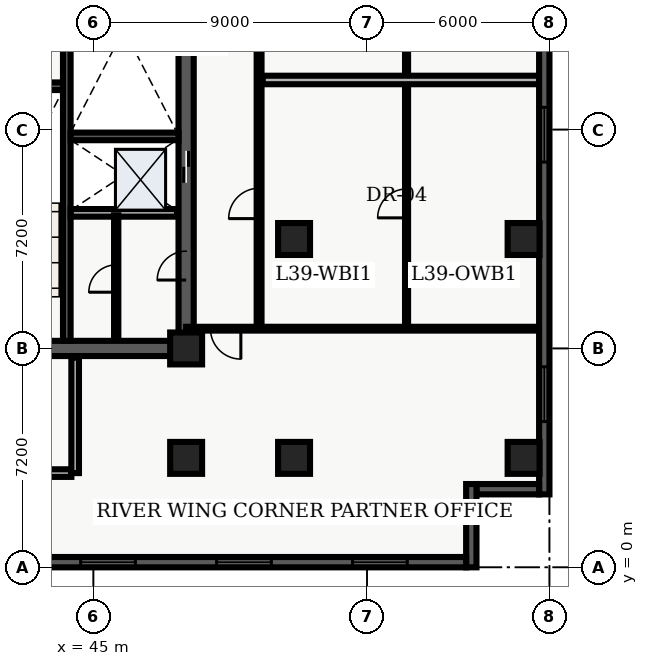
"""IFC4 building model, lengths in metres.
Left out: names, types, materials, properties, quantities, classifications, styles, units other than length and angle.
Written with IfcOpenShell. Run it as: python <this file> out.ifc"""

import sys

from ifc_helpers import new_model, entity, si_unit, converted_unit, direction, frame, origin_with_axes, origin_2d_with_axis, place, context, subcontext, project, spatial, polyline, rectangle, outline, extrude, element, fill, save


model = new_model("IFC4")
c1 = context("Model", 3, precision=1e-05, world=origin_with_axes(), true_north=direction((0.0, 1.0)))
c2 = subcontext(c1, "Body", "Model", "MODEL_VIEW")
j1 = project(units=[si_unit("LENGTHUNIT", "METRE"), converted_unit("PLANEANGLEUNIT", "DEGREE", entity("IfcPlaneAngleMeasure", 0.017), si_unit("PLANEANGLEUNIT", "RADIAN"), dimensions=[0, 0, 0, 0, 0, 0, 0])], contexts=[c1])
p1 = place(None, origin_with_axes())
s1 = spatial("IfcSite", under=j1, at=p1, CompositionType="ELEMENT")
p2 = place(p1, origin_with_axes())
s2 = spatial("IfcBuilding", under=s1, at=p2, CompositionType="ELEMENT")
p3 = place(p2, frame((0.0, 0.0, 160.2), z_axis=(0.0, 0.0, 1.0), x_axis=(1.0, 0.0, 0.0)))
s3 = spatial("IfcBuildingStorey", under=s2, at=p3, CompositionType="ELEMENT", Elevation=160.2)
p4 = place(p3, frame((40.2, 7.2, 0.0), z_axis=(0.0, 0.0, 1.0), x_axis=(1.0, 0.0, 0.0)))
e1 = element("IfcWall", 1, at=p4, inside=s3, PredefinedType="SHEAR", context=c2, shape_type="SweptSolid", body=[
    extrude(outline(polyline([(0.0, -0.25), (7.85, -0.25), (7.85, 0.25), (0.0, 0.25), (0.0, -0.25)])), origin_with_axes(), (0.0, 0.0, 1.0), 3.66),
])
p5 = place(p4, frame((2.175, 0.0, 0.0), z_axis=(0.0, 0.0, 1.0), x_axis=(1.0, 0.0, 0.0)))
e2 = element("IfcOpeningElement", 2, at=p5, cuts=e1, PredefinedType="OPENING", context=c2, shape_type="SweptSolid", body=[
    extrude(rectangle(XDim=1.05, YDim=0.52, at=origin_2d_with_axis()), origin_with_axes(), (0.0, 0.0, 1.0), 2.15),
])
p6 = place(p3, frame((48.05, 7.2, 0.0), z_axis=(0.0, 0.0, 1.0), x_axis=(0.0, 1.0, 0.0)))
e3 = element("IfcWall", 3, at=p6, inside=s3, PredefinedType="SHEAR", context=c2, shape_type="SweptSolid", body=[
    extrude(outline(polyline([(0.0, -0.25), (15.6, -0.25), (15.6, 0.25), (0.0, 0.25), (0.0, -0.25)])), origin_with_axes(), (0.0, 0.0, 1.0), 3.66),
])
p7 = place(p6, frame((5.975, 0.0, 0.0), z_axis=(0.0, 0.0, 1.0), x_axis=(1.0, 0.0, 0.0)))
e4 = element("IfcOpeningElement", 4, at=p7, cuts=e3, PredefinedType="OPENING", context=c2, shape_type="SweptSolid", body=[
    extrude(rectangle(XDim=1.05, YDim=0.52, at=origin_2d_with_axis()), origin_with_axes(), (0.0, 0.0, 1.0), 2.15),
])
p8 = place(p6, frame((2.725, 0.0, 0.0), z_axis=(0.0, 0.0, 1.0), x_axis=(1.0, 0.0, 0.0)))
e5 = element("IfcOpeningElement", 5, at=p8, cuts=e3, PredefinedType="OPENING", context=c2, shape_type="SweptSolid", body=[
    extrude(rectangle(XDim=0.95, YDim=0.52, at=origin_2d_with_axis()), origin_with_axes(), (0.0, 0.0, 1.0), 2.15),
])
p9 = place(p3, frame((44.125, 7.45, 0.0), z_axis=(0.0, 0.0, 1.0), x_axis=(0.0, 1.0, 0.0)))
e6 = element("IfcWall", 6, at=p9, inside=s3, PredefinedType="SHEAR", context=c2, shape_type="SweptSolid", body=[
    extrude(outline(polyline([(0.0, -0.125), (15.1, -0.125), (15.1, 0.125), (0.0, 0.125), (0.0, -0.125)])), origin_with_axes(), (0.0, 0.0, 1.0), 3.66),
])
for number, where, z_axis, x_axis in (
    (7, (40.45, 15.825, 0.0), (0.0, 0.0, 1.0), (1.0, 0.0, 0.0)),
    (8, (44.25, 14.175, 0.0), (0.0, 0.0, 1.0), (1.0, 0.0, 0.0)),
):
    element("IfcWall", number, at=place(p3, frame(where, z_axis=z_axis, x_axis=x_axis)), inside=s3, PredefinedType="SHEAR", context=c2, shape_type="SweptSolid", body=[
        extrude(outline(polyline([(0.0, -0.125), (3.55, -0.125), (3.55, 0.125), (0.0, 0.125), (0.0, -0.125)])), origin_with_axes(), (0.0, 0.0, 1.0), 3.66),
    ])
p10 = place(p3, frame((40.325, 3.1, 0.0), z_axis=(0.0, 0.0, 1.0), x_axis=(1.0, 0.0, 0.0)))
e9 = element("IfcWall", 9, at=p10, inside=s3, PredefinedType="SOLIDWALL", context=c2, shape_type="SweptSolid", body=[
    extrude(outline(polyline([(0.0, -0.125), (3.95, -0.125), (3.95, 0.125), (0.0, 0.125), (0.0, -0.125)])), origin_with_axes(), (0.0, 0.0, 1.0), 2.7),
])
p11 = place(p3, frame((44.4, 3.1, 0.0), z_axis=(0.0, 0.0, 1.0), x_axis=(0.0, 1.0, 0.0)))
e10 = element("IfcWall", 10, at=p11, inside=s3, PredefinedType="SOLIDWALL", context=c2, shape_type="SweptSolid", body=[
    extrude(outline(polyline([(0.0, -0.125), (3.8, -0.125), (3.8, 0.125), (0.0, 0.125), (0.0, -0.125)])), origin_with_axes(), (0.0, 0.0, 1.0), 2.7),
])
for number, where, z_axis, x_axis in (
    (11, (48.05, 3.6, 0.0), (0.0, 0.0, 1.0), (1.0, 0.0, 0.0)),
    (12, (48.05, 7.2, 0.0), (0.0, 0.0, 1.0), (1.0, 0.0, 0.0)),
    (13, (51.6, 3.6, 0.0), (0.0, 0.0, 1.0), (1.0, 0.0, 0.0)),
    (14, (51.6, 10.8, 0.0), (0.0, 0.0, 1.0), (1.0, 0.0, 0.0)),
    (15, (59.15, 3.6, 0.0), (0.0, 0.0, 1.0), (1.0, 0.0, 0.0)),
    (16, (59.15, 10.8, 0.0), (0.0, 0.0, 1.0), (1.0, 0.0, 0.0)),
):
    element("IfcColumn", number, at=place(p3, frame(where, z_axis=z_axis, x_axis=x_axis)), inside=s3, PredefinedType="COLUMN", context=c2, shape_type="SweptSolid", body=[
        extrude(rectangle(XDim=1.05, YDim=1.05, at=origin_2d_with_axis()), origin_with_axes(), (0.0, 0.0, 1.0), 3.9),
    ])
p12 = place(p3, frame((44.25, 11.66, 0.0), z_axis=(0.0, 0.0, 1.0), x_axis=(1.0, 0.0, 0.0)))
e17 = element("IfcWall", 17, at=p12, inside=s3, PredefinedType="SOLIDWALL", context=c2, shape_type="SweptSolid", body=[
    extrude(outline(polyline([(0.0, -0.125), (3.5, -0.125), (3.5, 0.125), (0.0, 0.125), (0.0, -0.125)])), origin_with_axes(), (0.0, 0.0, 1.0), 2.7),
])
p13 = place(p3, frame((45.75, 7.5, 0.0), z_axis=(0.0, 0.0, 1.0), x_axis=(0.0, 1.0, 0.0)))
e18 = element("IfcWall", 18, at=p13, inside=s3, PredefinedType="PARTITIONING", context=c2, shape_type="SweptSolid", body=[
    extrude(outline(polyline([(0.0, -0.07), (4.08, -0.07), (4.08, 0.07), (0.0, 0.07), (0.0, -0.07)])), origin_with_axes(), (0.0, 0.0, 1.0), 2.7),
])
p14 = place(p13, frame((2.0, 0.0, 0.0), z_axis=(0.0, 0.0, 1.0), x_axis=(1.0, 0.0, 0.0)))
e19 = element("IfcOpeningElement", 19, at=p14, cuts=e18, PredefinedType="OPENING", context=c2, shape_type="SweptSolid", body=[
    extrude(rectangle(XDim=0.9, YDim=0.16, at=origin_2d_with_axis()), origin_with_axes(), (0.0, 0.0, 1.0), 2.15),
])
p15 = place(p3, frame((50.45, 7.85, 0.0), z_axis=(0.0, 0.0, 1.0), x_axis=(0.0, 1.0, 0.0)))
e20 = element("IfcWall", 20, at=p15, inside=s3, PredefinedType="PARTITIONING", context=c2, shape_type="SweptSolid", body=[
    extrude(outline(polyline([(0.0, -0.08), (18.8, -0.08), (18.8, 0.08), (0.0, 0.08), (0.0, -0.08)])), origin_with_axes(), (0.0, 0.0, 1.0), 2.7),
])
p16 = place(p15, frame((4.12, 0.0, 0.0), z_axis=(0.0, 0.0, 1.0), x_axis=(1.0, 0.0, 0.0)))
e21 = element("IfcOpeningElement", 21, at=p16, cuts=e20, PredefinedType="OPENING", context=c2, shape_type="SweptSolid", body=[
    extrude(rectangle(XDim=1.0, YDim=0.18, at=origin_2d_with_axis()), origin_with_axes(), (0.0, 0.0, 1.0), 2.15),
])
p17 = place(p15, frame((13.46, 0.0, 0.0), z_axis=(0.0, 0.0, 1.0), x_axis=(1.0, 0.0, 0.0)))
e22 = element("IfcOpeningElement", 22, at=p17, cuts=e20, PredefinedType="OPENING", context=c2, shape_type="SweptSolid", body=[
    extrude(rectangle(XDim=1.0, YDim=0.18, at=origin_2d_with_axis()), origin_with_axes(), (0.0, 0.0, 1.0), 2.15),
])
p18 = place(p3, frame((59.665, 7.85, 0.0), z_axis=(0.0, 0.0, 1.0), x_axis=(-1.0, 0.0, 0.0)))
e23 = element("IfcWall", 23, at=p18, inside=s3, PredefinedType="PARTITIONING", context=c2, shape_type="SweptSolid", body=[
    extrude(outline(polyline([(0.0, -0.062), (11.615, -0.062), (11.615, 0.062), (0.0, 0.062), (0.0, -0.062)])), origin_with_axes(), (0.0, 0.0, 1.0), 2.7),
])
p19 = place(p18, frame((10.315, 0.0, 0.0), z_axis=(0.0, 0.0, 1.0), x_axis=(1.0, 0.0, 0.0)))
e24 = element("IfcOpeningElement", 24, at=p19, cuts=e23, PredefinedType="OPENING", context=c2, shape_type="SweptSolid", body=[
    extrude(rectangle(XDim=1.0, YDim=0.145, at=origin_2d_with_axis()), origin_with_axes(), (0.0, 0.0, 1.0), 2.15),
])
p20 = place(p3, frame((55.3, 7.98, 0.0), z_axis=(0.0, 0.0, 1.0), x_axis=(0.0, 1.0, 0.0)))
e25 = element("IfcWall", 25, at=p20, inside=s3, PredefinedType="PARTITIONING", context=c2, shape_type="SweptSolid", body=[
    extrude(outline(polyline([(0.0, -0.05), (18.54, -0.05), (18.54, 0.05), (0.0, 0.05), (0.0, -0.05)])), origin_with_axes(), (0.0, 0.0, 1.0), 2.7),
])
p21 = place(p20, frame((3.99, 0.0, 0.0), z_axis=(0.0, 0.0, 1.0), x_axis=(1.0, 0.0, 0.0)))
e26 = element("IfcOpeningElement", 26, at=p21, cuts=e25, PredefinedType="OPENING", context=c2, shape_type="SweptSolid", body=[
    extrude(rectangle(XDim=0.95, YDim=0.12, at=origin_2d_with_axis()), origin_with_axes(), (0.0, 0.0, 1.0), 2.15),
])
p22 = place(p20, frame((13.331, 0.0, 0.0), z_axis=(0.0, 0.0, 1.0), x_axis=(1.0, 0.0, 0.0)))
e27 = element("IfcOpeningElement", 27, at=p22, cuts=e25, PredefinedType="OPENING", context=c2, shape_type="SweptSolid", body=[
    extrude(rectangle(XDim=0.95, YDim=0.12, at=origin_2d_with_axis()), origin_with_axes(), (0.0, 0.0, 1.0), 2.15),
])
p23 = place(p3, frame((50.57, 16.031, 0.0), z_axis=(0.0, 0.0, 1.0), x_axis=(1.0, 0.0, 0.0)))
e28 = element("IfcWall", 28, at=p23, inside=s3, PredefinedType="PARTITIONING", context=c2, shape_type="SweptSolid", body=[
    extrude(outline(polyline([(0.0, -0.14), (9.095, -0.14), (9.095, 0.14), (0.0, 0.14), (0.0, -0.14)])), origin_with_axes(), (0.0, 0.0, 1.0), 2.7),
])
p24 = place(p3, frame((59.83, 26.06, 0.0), z_axis=(0.0, 0.0, 1.0), x_axis=(0.0, -1.0, 0.0)))
e29 = element("IfcWall", 29, at=p24, inside=s3, PredefinedType="SOLIDWALL", context=c2, shape_type="SweptSolid", body=[
    extrude(outline(polyline([(0.0, -0.17), (23.66, -0.17), (23.66, 0.17), (0.0, 0.17), (0.0, -0.17)])), origin_with_axes(), (0.0, 0.0, 1.0), 3.66),
])
p25 = place(p24, frame((3.696, 0.0, 0.45), z_axis=(0.0, 0.0, 1.0), x_axis=(1.0, 0.0, 0.0)))
e30 = element("IfcOpeningElement", 30, at=p25, cuts=e29, PredefinedType="OPENING", context=c2, shape_type="SweptSolid", body=[
    extrude(rectangle(XDim=1.8, YDim=0.36, at=origin_2d_with_axis()), origin_with_axes(), (0.0, 0.0, 1.0), 2.1),
])
p26 = place(p24, frame((11.83, 0.0, 0.45), z_axis=(0.0, 0.0, 1.0), x_axis=(1.0, 0.0, 0.0)))
e31 = element("IfcOpeningElement", 31, at=p26, cuts=e29, PredefinedType="OPENING", context=c2, shape_type="SweptSolid", body=[
    extrude(rectangle(XDim=1.8, YDim=0.36, at=origin_2d_with_axis()), origin_with_axes(), (0.0, 0.0, 1.0), 2.1),
])
p27 = place(p24, frame((20.364, 0.0, 0.45), z_axis=(0.0, 0.0, 1.0), x_axis=(1.0, 0.0, 0.0)))
e32 = element("IfcOpeningElement", 32, at=p27, cuts=e29, PredefinedType="OPENING", context=c2, shape_type="SweptSolid", body=[
    extrude(rectangle(XDim=1.8, YDim=0.36, at=origin_2d_with_axis()), origin_with_axes(), (0.0, 0.0, 1.0), 2.1),
])
p28 = place(p3, frame((59.66, 2.57, 0.0), z_axis=(0.0, 0.0, 1.0), x_axis=(-1.0, 0.0, 0.0)))
e33 = element("IfcWall", 33, at=p28, inside=s3, PredefinedType="SOLIDWALL", context=c2, shape_type="SweptSolid", body=[
    extrude(outline(polyline([(0.0, -0.17), (2.06, -0.17), (2.06, 0.17), (0.0, 0.17), (0.0, -0.17)])), origin_with_axes(), (0.0, 0.0, 1.0), 3.66),
])
p29 = place(p3, frame((57.43, 2.74, 0.0), z_axis=(0.0, 0.0, 1.0), x_axis=(0.0, -1.0, 0.0)))
e34 = element("IfcWall", 34, at=p29, inside=s3, PredefinedType="SOLIDWALL", context=c2, shape_type="SweptSolid", body=[
    extrude(outline(polyline([(0.0, -0.17), (2.74, -0.17), (2.74, 0.17), (0.0, 0.17), (0.0, -0.17)])), origin_with_axes(), (0.0, 0.0, 1.0), 3.66),
])
p30 = place(p3, frame((57.26, 0.17, 0.0), z_axis=(0.0, 0.0, 1.0), x_axis=(-1.0, 0.0, 0.0)))
e35 = element("IfcWall", 35, at=p30, inside=s3, PredefinedType="SOLIDWALL", context=c2, shape_type="SweptSolid", body=[
    extrude(outline(polyline([(0.0, -0.17), (54.86, -0.17), (54.86, 0.17), (0.0, 0.17), (0.0, -0.17)])), origin_with_axes(), (0.0, 0.0, 1.0), 3.66),
])
p31 = place(p30, frame((2.836, 0.0, 0.45), z_axis=(0.0, 0.0, 1.0), x_axis=(1.0, 0.0, 0.0)))
e36 = element("IfcOpeningElement", 36, at=p31, cuts=e35, PredefinedType="OPENING", context=c2, shape_type="SweptSolid", body=[
    extrude(rectangle(XDim=1.8, YDim=0.36, at=origin_2d_with_axis()), origin_with_axes(), (0.0, 0.0, 1.0), 2.1),
])
p32 = place(p30, frame((7.307, 0.0, 0.45), z_axis=(0.0, 0.0, 1.0), x_axis=(1.0, 0.0, 0.0)))
e37 = element("IfcOpeningElement", 37, at=p32, cuts=e35, PredefinedType="OPENING", context=c2, shape_type="SweptSolid", body=[
    extrude(rectangle(XDim=1.8, YDim=0.36, at=origin_2d_with_axis()), origin_with_axes(), (0.0, 0.0, 1.0), 2.1),
])
p33 = place(p30, frame((11.779, 0.0, 0.45), z_axis=(0.0, 0.0, 1.0), x_axis=(1.0, 0.0, 0.0)))
e38 = element("IfcOpeningElement", 38, at=p33, cuts=e35, PredefinedType="OPENING", context=c2, shape_type="SweptSolid", body=[
    extrude(rectangle(XDim=1.8, YDim=0.36, at=origin_2d_with_axis()), origin_with_axes(), (0.0, 0.0, 1.0), 2.1),
])
p34 = place(p30, frame((16.251, 0.0, 0.45), z_axis=(0.0, 0.0, 1.0), x_axis=(1.0, 0.0, 0.0)))
e39 = element("IfcOpeningElement", 39, at=p34, cuts=e35, PredefinedType="OPENING", context=c2, shape_type="SweptSolid", body=[
    extrude(rectangle(XDim=1.8, YDim=0.36, at=origin_2d_with_axis()), origin_with_axes(), (0.0, 0.0, 1.0), 2.1),
])
p35 = place(p30, frame((20.723, 0.0, 0.45), z_axis=(0.0, 0.0, 1.0), x_axis=(1.0, 0.0, 0.0)))
e40 = element("IfcOpeningElement", 40, at=p35, cuts=e35, PredefinedType="OPENING", context=c2, shape_type="SweptSolid", body=[
    extrude(rectangle(XDim=1.8, YDim=0.36, at=origin_2d_with_axis()), origin_with_axes(), (0.0, 0.0, 1.0), 2.1),
])
p36 = place(p30, frame((25.194, 0.0, 0.45), z_axis=(0.0, 0.0, 1.0), x_axis=(1.0, 0.0, 0.0)))
e41 = element("IfcOpeningElement", 41, at=p36, cuts=e35, PredefinedType="OPENING", context=c2, shape_type="SweptSolid", body=[
    extrude(rectangle(XDim=1.8, YDim=0.36, at=origin_2d_with_axis()), origin_with_axes(), (0.0, 0.0, 1.0), 2.1),
])
p37 = place(p30, frame((34.138, 0.0, 0.45), z_axis=(0.0, 0.0, 1.0), x_axis=(1.0, 0.0, 0.0)))
e42 = element("IfcOpeningElement", 42, at=p37, cuts=e35, PredefinedType="OPENING", context=c2, shape_type="SweptSolid", body=[
    extrude(rectangle(XDim=1.8, YDim=0.36, at=origin_2d_with_axis()), origin_with_axes(), (0.0, 0.0, 1.0), 2.1),
])
p38 = place(p30, frame((38.609, 0.0, 0.45), z_axis=(0.0, 0.0, 1.0), x_axis=(1.0, 0.0, 0.0)))
e43 = element("IfcOpeningElement", 43, at=p38, cuts=e35, PredefinedType="OPENING", context=c2, shape_type="SweptSolid", body=[
    extrude(rectangle(XDim=1.8, YDim=0.36, at=origin_2d_with_axis()), origin_with_axes(), (0.0, 0.0, 1.0), 2.1),
])
p39 = place(p30, frame((42.231, 0.0, 0.45), z_axis=(0.0, 0.0, 1.0), x_axis=(1.0, 0.0, 0.0)))
e44 = element("IfcOpeningElement", 44, at=p39, cuts=e35, PredefinedType="OPENING", context=c2, shape_type="SweptSolid", body=[
    extrude(rectangle(XDim=1.8, YDim=0.36, at=origin_2d_with_axis()), origin_with_axes(), (0.0, 0.0, 1.0), 2.1),
])
p40 = place(p30, frame((47.553, 0.0, 0.45), z_axis=(0.0, 0.0, 1.0), x_axis=(1.0, 0.0, 0.0)))
e45 = element("IfcOpeningElement", 45, at=p40, cuts=e35, PredefinedType="OPENING", context=c2, shape_type="SweptSolid", body=[
    extrude(rectangle(XDim=1.8, YDim=0.36, at=origin_2d_with_axis()), origin_with_axes(), (0.0, 0.0, 1.0), 2.1),
])
p41 = place(p30, frame((52.024, 0.0, 0.45), z_axis=(0.0, 0.0, 1.0), x_axis=(1.0, 0.0, 0.0)))
e46 = element("IfcOpeningElement", 46, at=p41, cuts=e35, PredefinedType="OPENING", context=c2, shape_type="SweptSolid", body=[
    extrude(rectangle(XDim=1.8, YDim=0.36, at=origin_2d_with_axis()), origin_with_axes(), (0.0, 0.0, 1.0), 2.1),
])
p42 = place(p6, frame((5.975, 0.0, 0.0), z_axis=(0.0, 0.0, 1.0), x_axis=(1.0, 0.0, 0.0)))
e47 = element("IfcDoor", 47, at=p42, inside=s3, OperationType="SLIDING_TO_LEFT", PredefinedType="DOOR", context=c2, shape_type="SweptSolid", body=[
    extrude(rectangle(XDim=1.05, YDim=0.09, at=origin_2d_with_axis()), origin_with_axes(), (0.0, 0.0, 1.0), 2.15),
])
fill(e4, e47)
p43 = place(p13, frame((2.0, 0.0, 0.0), z_axis=(0.0, 0.0, 1.0), x_axis=(1.0, 0.0, 0.0)))
e48 = element("IfcDoor", 48, at=p43, inside=s3, OperationType="SINGLE_SWING_LEFT", PredefinedType="DOOR", context=c2, shape_type="SweptSolid", body=[
    extrude(rectangle(XDim=0.9, YDim=0.084, at=origin_2d_with_axis()), origin_with_axes(), (0.0, 0.0, 1.0), 2.15),
])
fill(e19, e48)
p44 = place(p6, frame((2.725, 0.0, 0.0), z_axis=(0.0, 0.0, 1.0), x_axis=(1.0, 0.0, 0.0)))
e49 = element("IfcDoor", 49, at=p44, inside=s3, OperationType="SINGLE_SWING_LEFT", PredefinedType="DOOR", context=c2, shape_type="SweptSolid", body=[
    extrude(rectangle(XDim=0.95, YDim=0.09, at=origin_2d_with_axis()), origin_with_axes(), (0.0, 0.0, 1.0), 2.15),
])
fill(e5, e49)
p45 = place(p18, frame((10.315, 0.0, 0.0), z_axis=(0.0, 0.0, 1.0), x_axis=(1.0, 0.0, 0.0)))
e50 = element("IfcDoor", 50, at=p45, inside=s3, OperationType="SINGLE_SWING_LEFT", PredefinedType="DOOR", context=c2, shape_type="SweptSolid", body=[
    extrude(rectangle(XDim=1.0, YDim=0.075, at=origin_2d_with_axis()), origin_with_axes(), (0.0, 0.0, 1.0), 2.15),
])
fill(e24, e50)
p46 = place(p20, frame((3.99, 0.0, 0.0), z_axis=(0.0, 0.0, 1.0), x_axis=(1.0, 0.0, 0.0)))
e51 = element("IfcDoor", 51, at=p46, inside=s3, OperationType="SINGLE_SWING_LEFT", PredefinedType="DOOR", context=c2, shape_type="SweptSolid", body=[
    extrude(rectangle(XDim=0.95, YDim=0.06, at=origin_2d_with_axis()), origin_with_axes(), (0.0, 0.0, 1.0), 2.15),
])
fill(e26, e51)
p47 = place(p15, frame((4.12, 0.0, 0.0), z_axis=(0.0, 0.0, 1.0), x_axis=(1.0, 0.0, 0.0)))
e52 = element("IfcDoor", 52, at=p47, inside=s3, OperationType="SINGLE_SWING_LEFT", PredefinedType="DOOR", context=c2, shape_type="SweptSolid", body=[
    extrude(rectangle(XDim=1.0, YDim=0.09, at=origin_2d_with_axis()), origin_with_axes(), (0.0, 0.0, 1.0), 2.15),
])
fill(e21, e52)
p48 = place(p24, frame((11.83, 0.0, 0.45), z_axis=(0.0, 0.0, 1.0), x_axis=(1.0, 0.0, 0.0)))
e53 = element("IfcWindow", 53, at=p48, inside=s3, PredefinedType="WINDOW", context=c2, shape_type="SweptSolid", body=[
    extrude(rectangle(XDim=1.8, YDim=0.09, at=origin_2d_with_axis()), origin_with_axes(), (0.0, 0.0, 1.0), 2.1),
])
fill(e31, e53)
p49 = place(p24, frame((20.364, 0.0, 0.45), z_axis=(0.0, 0.0, 1.0), x_axis=(1.0, 0.0, 0.0)))
e54 = element("IfcWindow", 54, at=p49, inside=s3, PredefinedType="WINDOW", context=c2, shape_type="SweptSolid", body=[
    extrude(rectangle(XDim=1.8, YDim=0.09, at=origin_2d_with_axis()), origin_with_axes(), (0.0, 0.0, 1.0), 2.1),
])
fill(e32, e54)
p50 = place(p30, frame((2.836, 0.0, 0.45), z_axis=(0.0, 0.0, 1.0), x_axis=(1.0, 0.0, 0.0)))
e55 = element("IfcWindow", 55, at=p50, inside=s3, PredefinedType="WINDOW", context=c2, shape_type="SweptSolid", body=[
    extrude(rectangle(XDim=1.8, YDim=0.09, at=origin_2d_with_axis()), origin_with_axes(), (0.0, 0.0, 1.0), 2.1),
])
fill(e36, e55)
p51 = place(p30, frame((7.307, 0.0, 0.45), z_axis=(0.0, 0.0, 1.0), x_axis=(1.0, 0.0, 0.0)))
e56 = element("IfcWindow", 56, at=p51, inside=s3, PredefinedType="WINDOW", context=c2, shape_type="SweptSolid", body=[
    extrude(rectangle(XDim=1.8, YDim=0.09, at=origin_2d_with_axis()), origin_with_axes(), (0.0, 0.0, 1.0), 2.1),
])
fill(e37, e56)
p52 = place(p30, frame((11.779, 0.0, 0.45), z_axis=(0.0, 0.0, 1.0), x_axis=(1.0, 0.0, 0.0)))
e57 = element("IfcWindow", 57, at=p52, inside=s3, PredefinedType="WINDOW", context=c2, shape_type="SweptSolid", body=[
    extrude(rectangle(XDim=1.8, YDim=0.09, at=origin_2d_with_axis()), origin_with_axes(), (0.0, 0.0, 1.0), 2.1),
])
fill(e38, e57)
save(model, sys.argv[1])
